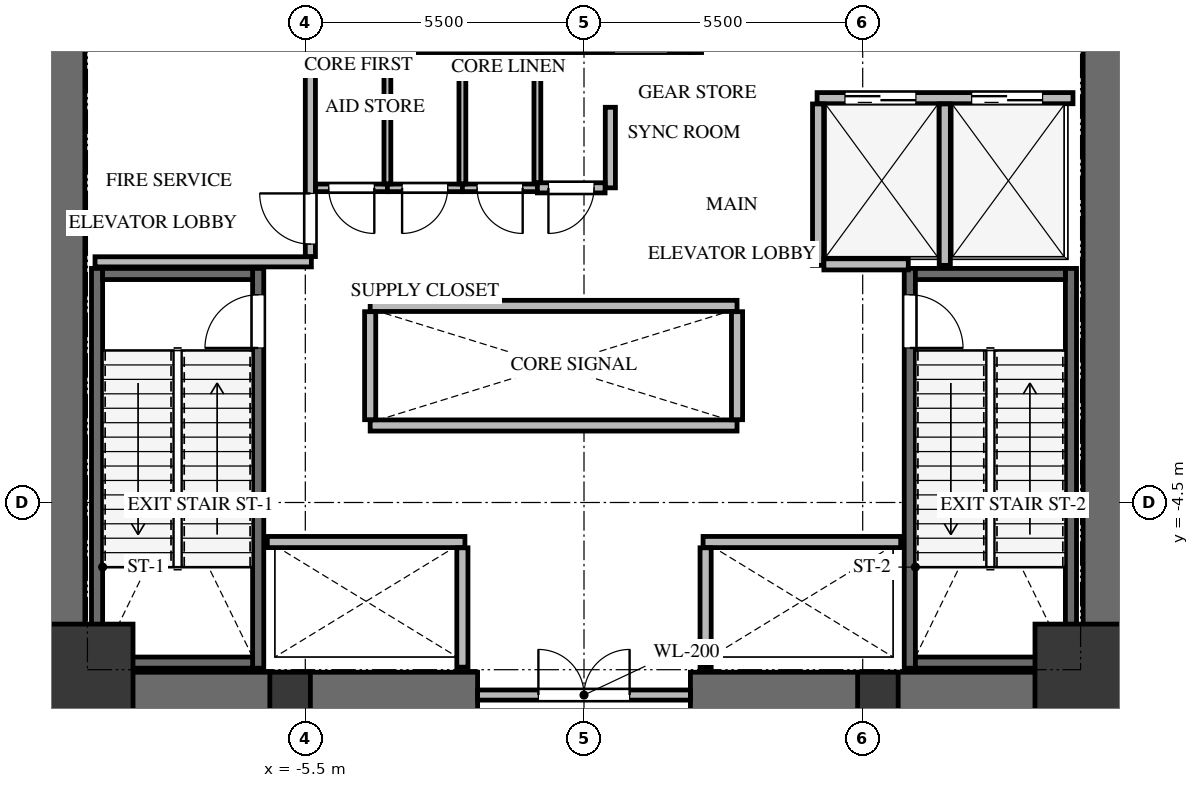
"""IFC4 building model, lengths in metres.
Left out: names, types, materials, properties, quantities, classifications, styles, units other than length and angle.
Written with IfcOpenShell. Run it as: python <this file> out.ifc"""

import sys

from ifc_helpers import new_model, si_unit, direction, frame, frame_2d, origin, origin_2d, place, context, subcontext, project, spatial, rectangle, extrude, source, transform, mapped, element, fill, save


model = new_model("IFC4")
c1 = context("Model", 3, precision=1e-05, world=origin(), true_north=direction((0.0, 1.0)))
c2 = subcontext(c1, "Body", "Model", "MODEL_VIEW")
j1 = project(units=[si_unit("LENGTHUNIT", "METRE"), si_unit("PLANEANGLEUNIT", "RADIAN")], contexts=[c1])
p1 = place(None, origin())
s1 = spatial("IfcSite", under=j1, at=p1, CompositionType="ELEMENT")
p2 = place(p1, origin())
s2 = spatial("IfcBuilding", under=s1, at=p2, CompositionType="ELEMENT")
p3 = place(p2, frame((0.0, 0.0, 26.8)))
s3 = spatial("IfcBuildingStorey", under=s2, at=p3, CompositionType="ELEMENT", Elevation=26.8)
for number, where, z_axis, x_axis in (
    (1, (-10.3, -8.75, 0.0), (0.0, 0.0, 1.0), (0.0, 1.0, 0.0)),
    (2, (10.3, -8.75, 0.0), (0.0, 0.0, 1.0), (0.0, 1.0, 0.0)),
):
    element("IfcWall", number, at=place(p3, frame(where, z_axis=z_axis, x_axis=x_axis)), inside=s3, PredefinedType="SHEAR", context=c2, shape_type="SweptSolid", body=[
        extrude(rectangle(XDim=17.5, YDim=0.9, at=frame_2d((8.75, 0.0))), origin(), (0.0, 0.0, 1.0), 5.6),
    ])
for number, where, z_axis, x_axis in (
    (3, (-9.85, -8.3, 0.0), (0.0, 0.0, 1.0), (1.0, 0.0, 0.0)),
    (4, (2.1, -8.3, 0.0), (0.0, 0.0, 1.0), (1.0, 0.0, 0.0)),
):
    element("IfcWall", number, at=place(p3, frame(where, z_axis=z_axis, x_axis=x_axis)), inside=s3, PredefinedType="SHEAR", context=c2, shape_type="SweptSolid", body=[
        extrude(rectangle(XDim=7.75, YDim=0.9, at=frame_2d((3.875, 0.0))), origin(), (0.0, 0.0, 1.0), 5.6),
    ])
p4 = place(p3, frame((-6.43, -7.77, -0.32), z_axis=(0.0, 0.0, 1.0), x_axis=(0.0, 1.0, 0.0)))
e5 = element("IfcWall", 5, at=p4, inside=s3, PredefinedType="SHEAR", context=c2, shape_type="SweptSolid", body=[
    extrude(rectangle(XDim=7.89, YDim=0.22, at=frame_2d((3.945, 0.0))), origin(), (0.0, 0.0, 1.0), 5.68),
])
p5 = place(p4, frame((6.32, 0.0, 0.0)))
e6 = element("IfcOpeningElement", 6, at=p5, cuts=e5, PredefinedType="OPENING", context=c2, shape_type="SweptSolid", body=[
    extrude(rectangle(XDim=1.05, YDim=2.15, at=frame_2d((0.525, 1.075))), frame((0.0, 0.12, 0.0), z_axis=(0.0, -1.0, 0.0), x_axis=(1.0, 0.0, 0.0)), (0.0, 0.0, 1.0), 0.24),
])
p6 = place(p3, frame((-9.61, 0.12, -0.32), z_axis=(0.0, 0.0, 1.0), x_axis=(0.0, -1.0, 0.0)))
e7 = element("IfcWall", 7, at=p6, inside=s3, PredefinedType="SHEAR", context=c2, shape_type="SweptSolid", body=[
    extrude(rectangle(XDim=7.89, YDim=0.22, at=frame_2d((3.945, 0.0))), origin(), (0.0, 0.0, 1.0), 5.68),
])
for number, where, z_axis, x_axis in (
    (8, (-9.5, -7.66, -0.32), (0.0, 0.0, 1.0), (1.0, 0.0, 0.0)),
    (9, (-6.54, 0.01, -0.32), (0.0, 0.0, 1.0), (-1.0, 0.0, 0.0)),
):
    element("IfcWall", number, at=place(p3, frame(where, z_axis=z_axis, x_axis=x_axis)), inside=s3, PredefinedType="SHEAR", context=c2, shape_type="SweptSolid", body=[
        extrude(rectangle(XDim=2.96, YDim=0.22, at=frame_2d((1.48, 0.0))), origin(), (0.0, 0.0, 1.0), 5.68),
    ])
p7 = place(p3, frame((9.61, -7.77, -0.32), z_axis=(0.0, 0.0, 1.0), x_axis=(0.0, 1.0, 0.0)))
e10 = element("IfcWall", 10, at=p7, inside=s3, PredefinedType="SHEAR", context=c2, shape_type="SweptSolid", body=[
    extrude(rectangle(XDim=7.89, YDim=0.22, at=frame_2d((3.945, 0.0))), origin(), (0.0, 0.0, 1.0), 5.68),
])
p8 = place(p3, frame((6.43, 0.12, -0.32), z_axis=(0.0, 0.0, 1.0), x_axis=(0.0, -1.0, 0.0)))
e11 = element("IfcWall", 11, at=p8, inside=s3, PredefinedType="SHEAR", context=c2, shape_type="SweptSolid", body=[
    extrude(rectangle(XDim=7.89, YDim=0.22, at=frame_2d((3.945, 0.0))), origin(), (0.0, 0.0, 1.0), 5.68),
])
p9 = place(p8, frame((0.52, 0.0, 0.0)))
e12 = element("IfcOpeningElement", 12, at=p9, cuts=e11, PredefinedType="OPENING", context=c2, shape_type="SweptSolid", body=[
    extrude(rectangle(XDim=1.05, YDim=2.15, at=frame_2d((0.525, 1.075))), frame((0.0, 0.12, 0.0), z_axis=(0.0, -1.0, 0.0), x_axis=(1.0, 0.0, 0.0)), (0.0, 0.0, 1.0), 0.24),
])
for number, where, z_axis, x_axis in (
    (13, (6.54, -7.66, -0.32), (0.0, 0.0, 1.0), (1.0, 0.0, 0.0)),
    (14, (9.5, 0.01, -0.32), (0.0, 0.0, 1.0), (-1.0, 0.0, 0.0)),
):
    element("IfcWall", number, at=place(p3, frame(where, z_axis=z_axis, x_axis=x_axis)), inside=s3, PredefinedType="SHEAR", context=c2, shape_type="SweptSolid", body=[
        extrude(rectangle(XDim=2.96, YDim=0.22, at=frame_2d((1.48, 0.0))), origin(), (0.0, 0.0, 1.0), 5.68),
    ])
for number, where, z_axis, x_axis in (
    (15, (2.21, 4.38, -0.32), (0.0, 0.0, 1.0), (0.0, 1.0, 0.0)),
    (16, (-5.36, 7.78, -0.32), (0.0, 0.0, 1.0), (0.0, -1.0, 0.0)),
):
    element("IfcWall", number, at=place(p3, frame(where, z_axis=z_axis, x_axis=x_axis)), inside=s3, PredefinedType="SHEAR", context=c2, shape_type="SweptSolid", body=[
        extrude(rectangle(XDim=3.4, YDim=0.22, at=frame_2d((1.7, 0.0))), origin(), (0.0, 0.0, 1.0), 5.68),
    ])
p10 = place(p3, frame((-5.25, 4.49, -0.32), z_axis=(0.0, 0.0, 1.0), x_axis=(1.0, 0.0, 0.0)))
e17 = element("IfcWall", 17, at=p10, inside=s3, PredefinedType="SHEAR", context=c2, shape_type="SweptSolid", body=[
    extrude(rectangle(XDim=7.35, YDim=0.22, at=frame_2d((3.675, 0.0))), origin(), (0.0, 0.0, 1.0), 5.68),
])
p11 = place(p10, frame((5.85, 0.0, 0.0)))
e18 = element("IfcOpeningElement", 18, at=p11, cuts=e17, PredefinedType="OPENING", context=c2, shape_type="SweptSolid", body=[
    extrude(rectangle(XDim=1.05, YDim=2.15, at=frame_2d((0.525, 1.075))), frame((0.0, 0.12, 0.0), z_axis=(0.0, -1.0, 0.0), x_axis=(1.0, 0.0, 0.0)), (0.0, 0.0, 1.0), 0.24),
])
m1 = source(origin(), c2, "Body", "SweptSolid", [
    extrude(rectangle(XDim=1.8, YDim=1.8, at=origin_2d()), origin(), (0.0, 0.0, 1.0), 5.68),
])
for number, where, z_axis, x_axis in (
    (19, (-9.8, -7.8, -0.32), (0.0, 0.0, 1.0), (1.0, 0.0, 0.0)),
    (20, (9.8, -7.8, -0.32), (0.0, 0.0, 1.0), (1.0, 0.0, 0.0)),
):
    element("IfcColumn", number, at=place(p3, frame(where, z_axis=z_axis, x_axis=x_axis)), inside=s3, PredefinedType="COLUMN", context=c2, shape_type="MappedRepresentation", body=[
        mapped(m1, transform((0.0, 0.0, 0.0), x_axis=(1.0, 0.0, 0.0), y_axis=(0.0, 1.0, 0.0), z_axis=(0.0, 0.0, 1.0), scale=1.0)),
    ])
m2 = source(origin(), c2, "Body", "SweptSolid", [
    extrude(rectangle(XDim=0.8, YDim=0.8, at=origin_2d()), origin(), (0.0, 0.0, 1.0), 5.68),
])
for number, where, z_axis, x_axis in (
    (21, (-5.8, -8.25, -0.32), (0.0, 0.0, 1.0), (1.0, 0.0, 0.0)),
    (22, (5.8, -8.25, -0.32), (0.0, 0.0, 1.0), (1.0, 0.0, 0.0)),
):
    element("IfcColumn", number, at=place(p3, frame(where, z_axis=z_axis, x_axis=x_axis)), inside=s3, PredefinedType="PILASTER", context=c2, shape_type="MappedRepresentation", body=[
        mapped(m2, transform((0.0, 0.0, 0.0), x_axis=(1.0, 0.0, 0.0), y_axis=(0.0, 1.0, 0.0), z_axis=(0.0, 0.0, 1.0), scale=1.0)),
    ])
p12 = place(p3, frame((-2.1, -8.3, 0.0), z_axis=(0.0, 0.0, 1.0), x_axis=(1.0, 0.0, 0.0)))
e23 = element("IfcWall", 23, at=p12, inside=s3, PredefinedType="SOLIDWALL", context=c2, shape_type="SweptSolid", body=[
    extrude(rectangle(XDim=4.2, YDim=0.2, at=frame_2d((2.1, 0.0))), origin(), (0.0, 0.0, 1.0), 5.345),
])
p13 = place(p12, frame((1.2, 0.0, 0.0)))
e24 = element("IfcOpeningElement", 24, at=p13, cuts=e23, PredefinedType="OPENING", context=c2, shape_type="SweptSolid", body=[
    extrude(rectangle(XDim=1.8, YDim=2.15, at=frame_2d((0.9, 1.075))), frame((0.0, 0.11, 0.0), z_axis=(0.0, -1.0, 0.0), x_axis=(1.0, 0.0, 0.0)), (0.0, 0.0, 1.0), 0.22),
])
p14 = place(p3, frame((-9.65, 0.25, 0.0), z_axis=(0.0, 0.0, 1.0), x_axis=(1.0, 0.0, 0.0)))
e25 = element("IfcWall", 25, at=p14, inside=s3, PredefinedType="SOLIDWALL", context=c2, shape_type="SweptSolid", body=[
    extrude(rectangle(XDim=4.27, YDim=0.2, at=frame_2d((2.135, 0.0))), origin(), (0.0, 0.0, 1.0), 5.345),
])
p15 = place(p3, frame((-5.4, 0.354, 0.0), z_axis=(0.0, 0.0, 1.0), x_axis=(0.0, 1.0, 0.0)))
e26 = element("IfcWall", 26, at=p15, inside=s3, PredefinedType="SOLIDWALL", context=c2, shape_type="SweptSolid", body=[
    extrude(rectangle(XDim=4.026, YDim=0.2, at=frame_2d((2.013, 0.0))), origin(), (0.0, 0.0, 1.0), 5.345),
])
p16 = place(p15, frame((0.246, 0.0, 0.0)))
e27 = element("IfcOpeningElement", 27, at=p16, cuts=e26, PredefinedType="OPENING", context=c2, shape_type="SweptSolid", body=[
    extrude(rectangle(XDim=1.0, YDim=2.15, at=frame_2d((0.5, 1.075))), frame((0.0, 0.11, 0.0), z_axis=(0.0, -1.0, 0.0), x_axis=(1.0, 0.0, 0.0)), (0.0, 0.0, 1.0), 0.22),
])
p17 = place(p3, frame((4.6, 3.48, 0.0), z_axis=(0.0, 0.0, 1.0), x_axis=(1.0, 0.0, 0.0)))
e28 = element("IfcWall", 28, at=p17, inside=s3, PredefinedType="SOLIDWALL", context=c2, shape_type="SweptSolid", body=[
    extrude(rectangle(XDim=5.05, YDim=0.22, at=frame_2d((2.525, 0.0))), origin(), (0.0, 0.0, 1.0), 5.345),
])
p18 = place(p17, frame((0.55, 0.0, 0.0)))
e29 = element("IfcOpeningElement", 29, at=p18, cuts=e28, PredefinedType="OPENING", context=c2, shape_type="SweptSolid", body=[
    extrude(rectangle(XDim=1.4, YDim=2.15, at=frame_2d((0.7, 1.075))), frame((0.0, 0.12, 0.0), z_axis=(0.0, -1.0, 0.0), x_axis=(1.0, 0.0, 0.0)), (0.0, 0.0, 1.0), 0.24),
])
p19 = place(p17, frame((3.05, 0.0, 0.0)))
e30 = element("IfcOpeningElement", 30, at=p19, cuts=e28, PredefinedType="OPENING", context=c2, shape_type="SweptSolid", body=[
    extrude(rectangle(XDim=1.4, YDim=2.15, at=frame_2d((0.7, 1.075))), frame((0.0, 0.12, 0.0), z_axis=(0.0, -1.0, 0.0), x_axis=(1.0, 0.0, 0.0)), (0.0, 0.0, 1.0), 0.24),
])
for number, where, z_axis, x_axis in (
    (31, (4.62, 0.18, 0.0), (0.0, 0.0, 1.0), (0.0, 1.0, 0.0)),
    (32, (7.12, 0.18, 0.0), (0.0, 0.0, 1.0), (0.0, 1.0, 0.0)),
):
    element("IfcWall", number, at=place(p3, frame(where, z_axis=z_axis, x_axis=x_axis)), inside=s3, PredefinedType="SOLIDWALL", context=c2, shape_type="SweptSolid", body=[
        extrude(rectangle(XDim=3.186, YDim=0.22, at=frame_2d((1.593, 0.0))), origin(), (0.0, 0.0, 1.0), 5.345),
    ])
p20 = place(p3, frame((4.734, 0.2, 0.0), z_axis=(0.0, 0.0, 1.0), x_axis=(1.0, 0.0, 0.0)))
e33 = element("IfcWall", 33, at=p20, inside=s3, PredefinedType="SOLIDWALL", context=c2, shape_type="SweptSolid", body=[
    extrude(rectangle(XDim=1.666, YDim=0.22, at=frame_2d((0.833, 0.0))), origin(), (0.0, 0.0, 1.0), 5.345),
])
for number, where, z_axis, x_axis in (
    (34, (-6.25, -5.28, 0.0), (0.0, 0.0, 1.0), (1.0, 0.0, 0.0)),
    (35, (2.35, -5.28, 0.0), (0.0, 0.0, 1.0), (1.0, 0.0, 0.0)),
):
    element("IfcWall", number, at=place(p3, frame(where, z_axis=z_axis, x_axis=x_axis)), inside=s3, PredefinedType="SOLIDWALL", context=c2, shape_type="SweptSolid", body=[
        extrude(rectangle(XDim=3.9, YDim=0.22, at=frame_2d((1.95, 0.0))), origin(), (0.0, 0.0, 1.0), 5.345),
    ])
for number, where, z_axis, x_axis in (
    (36, (-2.4, -7.75, 0.0), (0.0, 0.0, 1.0), (0.0, 1.0, 0.0)),
    (37, (2.4, -7.75, 0.0), (0.0, 0.0, 1.0), (0.0, 1.0, 0.0)),
):
    element("IfcWall", number, at=place(p3, frame(where, z_axis=z_axis, x_axis=x_axis)), inside=s3, PredefinedType="SOLIDWALL", context=c2, shape_type="SweptSolid", body=[
        extrude(rectangle(XDim=2.356, YDim=0.22, at=frame_2d((1.178, 0.0))), origin(), (0.0, 0.0, 1.0), 5.345),
    ])
for number, where, z_axis, x_axis in (
    (38, (-4.22, -2.98, 0.0), (0.0, 0.0, 1.0), (1.0, 0.0, 0.0)),
    (39, (-4.22, -0.62, 0.0), (0.0, 0.0, 1.0), (1.0, 0.0, 0.0)),
):
    element("IfcWall", number, at=place(p3, frame(where, z_axis=z_axis, x_axis=x_axis)), inside=s3, PredefinedType="SOLIDWALL", context=c2, shape_type="SweptSolid", body=[
        extrude(rectangle(XDim=7.24, YDim=0.22, at=frame_2d((3.62, 0.0))), origin(), (0.0, 0.0, 1.0), 5.345),
    ])
for number, where, z_axis, x_axis in (
    (40, (-4.22, -2.866, 0.0), (0.0, 0.0, 1.0), (0.0, 1.0, 0.0)),
    (41, (3.02, -2.866, 0.0), (0.0, 0.0, 1.0), (0.0, 1.0, 0.0)),
):
    element("IfcWall", number, at=place(p3, frame(where, z_axis=z_axis, x_axis=x_axis)), inside=s3, PredefinedType="SOLIDWALL", context=c2, shape_type="SweptSolid", body=[
        extrude(rectangle(XDim=2.132, YDim=0.22, at=frame_2d((1.066, 0.0))), origin(), (0.0, 0.0, 1.0), 5.345),
    ])
p21 = place(p3, frame((-3.88, 1.71, 0.0), z_axis=(0.0, 0.0, 1.0), x_axis=(-1.0, 0.0, 0.0)))
e42 = element("IfcWall", 42, at=p21, inside=s3, PredefinedType="PARTITIONING", context=c2, shape_type="SweptSolid", body=[
    extrude(rectangle(XDim=1.416, YDim=0.15, at=frame_2d((0.708, 0.0))), origin(), (0.0, 0.0, 1.0), 5.345),
])
p22 = place(p21, frame((0.258, 0.0, 0.0)))
e43 = element("IfcOpeningElement", 43, at=p22, cuts=e42, PredefinedType="OPENING", context=c2, shape_type="SweptSolid", body=[
    extrude(rectangle(XDim=0.9, YDim=2.05, at=frame_2d((0.45, 1.025))), frame((0.0, 0.085, 0.0), z_axis=(0.0, -1.0, 0.0), x_axis=(1.0, 0.0, 0.0)), (0.0, 0.0, 1.0), 0.17),
])
p23 = place(p3, frame((-2.4, 1.71, 0.0), z_axis=(0.0, 0.0, 1.0), x_axis=(-1.0, 0.0, 0.0)))
e44 = element("IfcWall", 44, at=p23, inside=s3, PredefinedType="PARTITIONING", context=c2, shape_type="SweptSolid", body=[
    extrude(rectangle(XDim=1.48, YDim=0.15, at=frame_2d((0.74, 0.0))), origin(), (0.0, 0.0, 1.0), 5.345),
])
p24 = place(p23, frame((0.29, 0.0, 0.0)))
e45 = element("IfcOpeningElement", 45, at=p24, cuts=e44, PredefinedType="OPENING", context=c2, shape_type="SweptSolid", body=[
    extrude(rectangle(XDim=0.9, YDim=2.05, at=frame_2d((0.45, 1.025))), frame((0.0, 0.085, 0.0), z_axis=(0.0, -1.0, 0.0), x_axis=(1.0, 0.0, 0.0)), (0.0, 0.0, 1.0), 0.17),
])
p25 = place(p3, frame((-0.92, 1.71, 0.0), z_axis=(0.0, 0.0, 1.0), x_axis=(-1.0, 0.0, 0.0)))
e46 = element("IfcWall", 46, at=p25, inside=s3, PredefinedType="PARTITIONING", context=c2, shape_type="SweptSolid", body=[
    extrude(rectangle(XDim=1.48, YDim=0.15, at=frame_2d((0.74, 0.0))), origin(), (0.0, 0.0, 1.0), 5.345),
])
p26 = place(p25, frame((0.29, 0.0, 0.0)))
e47 = element("IfcOpeningElement", 47, at=p26, cuts=e46, PredefinedType="OPENING", context=c2, shape_type="SweptSolid", body=[
    extrude(rectangle(XDim=0.9, YDim=2.05, at=frame_2d((0.45, 1.025))), frame((0.0, 0.085, 0.0), z_axis=(0.0, -1.0, 0.0), x_axis=(1.0, 0.0, 0.0)), (0.0, 0.0, 1.0), 0.17),
])
p27 = place(p3, frame((0.52, 3.3, 0.0), z_axis=(0.0, 0.0, 1.0), x_axis=(0.0, -1.0, 0.0)))
e48 = element("IfcWall", 48, at=p27, inside=s3, PredefinedType="SOLIDWALL", context=c2, shape_type="SweptSolid", body=[
    extrude(rectangle(XDim=1.59, YDim=0.2, at=frame_2d((0.795, 0.0))), origin(), (0.0, 0.0, 1.0), 5.345),
])
p28 = place(p3, frame((0.416, 1.71, 0.0), z_axis=(0.0, 0.0, 1.0), x_axis=(-1.0, 0.0, 0.0)))
e49 = element("IfcWall", 49, at=p28, inside=s3, PredefinedType="SOLIDWALL", context=c2, shape_type="SweptSolid", body=[
    extrude(rectangle(XDim=1.336, YDim=0.2, at=frame_2d((0.668, 0.0))), origin(), (0.0, 0.0, 1.0), 5.345),
])
p29 = place(p28, frame((0.218, 0.0, 0.0)))
e50 = element("IfcOpeningElement", 50, at=p29, cuts=e49, PredefinedType="OPENING", context=c2, shape_type="SweptSolid", body=[
    extrude(rectangle(XDim=0.9, YDim=2.05, at=frame_2d((0.45, 1.025))), frame((0.0, 0.11, 0.0), z_axis=(0.0, -1.0, 0.0), x_axis=(1.0, 0.0, 0.0)), (0.0, 0.0, 1.0), 0.22),
])
for number, where, z_axis, x_axis in (
    (51, (-3.88, 4.375, 0.0), (0.0, 0.0, 1.0), (0.0, -1.0, 0.0)),
    (52, (-2.4, 4.375, 0.0), (0.0, 0.0, 1.0), (0.0, -1.0, 0.0)),
):
    element("IfcWall", number, at=place(p3, frame(where, z_axis=z_axis, x_axis=x_axis)), inside=s3, PredefinedType="PARTITIONING", context=c2, shape_type="SweptSolid", body=[
        extrude(rectangle(XDim=2.586, YDim=0.135, at=frame_2d((1.293, 0.0))), origin(), (0.0, 0.0, 1.0), 5.345),
    ])
p30 = place(p3, frame((-0.92, 4.375, 0.0), z_axis=(0.0, 0.0, 1.0), x_axis=(0.0, -1.0, 0.0)))
e53 = element("IfcWall", 53, at=p30, inside=s3, PredefinedType="PARTITIONING", context=c2, shape_type="SweptSolid", body=[
    extrude(rectangle(XDim=2.561, YDim=0.135, at=frame_2d((1.281, 0.0))), origin(), (0.0, 0.0, 1.0), 5.345),
])
m3 = source(origin(), c2, "Body", "SweptSolid", [
    extrude(rectangle(XDim=1.05, YDim=2.15, at=frame_2d((0.525, 1.075))), frame((0.0, 0.025, 0.0), z_axis=(0.0, -1.0, 0.0), x_axis=(1.0, 0.0, 0.0)), (0.0, 0.0, 1.0), 0.05),
])
p31 = place(p5, origin())
e54 = element("IfcDoor", 54, at=p31, inside=s3, OperationType="SINGLE_SWING_LEFT", PredefinedType="DOOR", context=c2, shape_type="MappedRepresentation", body=[
    mapped(m3, transform((0.0, 0.0, 0.0), x_axis=(1.0, 0.0, 0.0), y_axis=(0.0, 1.0, 0.0), z_axis=(0.0, 0.0, 1.0), scale=1.0)),
])
fill(e6, e54)
m4 = source(origin(), c2, "Body", "SweptSolid", [
    extrude(rectangle(XDim=1.05, YDim=2.15, at=frame_2d((0.525, 1.075))), frame((0.0, 0.025, 0.0), z_axis=(0.0, -1.0, 0.0), x_axis=(1.0, 0.0, 0.0)), (0.0, 0.0, 1.0), 0.05),
])
p32 = place(p9, origin())
e55 = element("IfcDoor", 55, at=p32, inside=s3, OperationType="SINGLE_SWING_RIGHT", PredefinedType="DOOR", context=c2, shape_type="MappedRepresentation", body=[
    mapped(m4, transform((0.0, 0.0, 0.0), x_axis=(1.0, 0.0, 0.0), y_axis=(0.0, 1.0, 0.0), z_axis=(0.0, 0.0, 1.0), scale=1.0)),
])
fill(e12, e55)
m5 = source(origin(), c2, "Body", "SweptSolid", [
    extrude(rectangle(XDim=1.8, YDim=2.15, at=frame_2d((0.9, 1.075))), frame((0.0, 0.025, 0.0), z_axis=(0.0, -1.0, 0.0), x_axis=(1.0, 0.0, 0.0)), (0.0, 0.0, 1.0), 0.05),
])
p33 = place(p13, origin())
e56 = element("IfcDoor", 56, at=p33, inside=s3, OperationType="DOUBLE_DOOR_SINGLE_SWING", PredefinedType="DOOR", context=c2, shape_type="MappedRepresentation", body=[
    mapped(m5, transform((0.0, 0.0, 0.0), x_axis=(1.0, 0.0, 0.0), y_axis=(0.0, 1.0, 0.0), z_axis=(0.0, 0.0, 1.0), scale=1.0)),
])
fill(e24, e56)
m6 = source(origin(), c2, "Body", "SweptSolid", [
    extrude(rectangle(XDim=1.0, YDim=2.15, at=frame_2d((0.5, 1.075))), frame((0.0, 0.025, 0.0), z_axis=(0.0, -1.0, 0.0), x_axis=(1.0, 0.0, 0.0)), (0.0, 0.0, 1.0), 0.05),
])
p34 = place(p16, origin())
e57 = element("IfcDoor", 57, at=p34, inside=s3, OperationType="SINGLE_SWING_RIGHT", PredefinedType="DOOR", context=c2, shape_type="MappedRepresentation", body=[
    mapped(m6, transform((0.0, 0.0, 0.0), x_axis=(1.0, 0.0, 0.0), y_axis=(0.0, 1.0, 0.0), z_axis=(0.0, 0.0, 1.0), scale=1.0)),
])
fill(e27, e57)
m7 = source(origin(), c2, "Body", "SweptSolid", [
    extrude(rectangle(XDim=1.4, YDim=2.15, at=frame_2d((0.7, 1.075))), frame((0.0, 0.025, 0.0), z_axis=(0.0, -1.0, 0.0), x_axis=(1.0, 0.0, 0.0)), (0.0, 0.0, 1.0), 0.05),
])
p35 = place(p18, origin())
e58 = element("IfcDoor", 58, at=p35, inside=s3, OperationType="DOUBLE_DOOR_SLIDING", PredefinedType="DOOR", context=c2, shape_type="MappedRepresentation", body=[
    mapped(m7, transform((0.0, 0.0, 0.0), x_axis=(1.0, 0.0, 0.0), y_axis=(0.0, 1.0, 0.0), z_axis=(0.0, 0.0, 1.0), scale=1.0)),
])
fill(e29, e58)
p36 = place(p19, origin())
e59 = element("IfcDoor", 59, at=p36, inside=s3, OperationType="DOUBLE_DOOR_SLIDING", PredefinedType="DOOR", context=c2, shape_type="MappedRepresentation", body=[
    mapped(m7, transform((0.0, 0.0, 0.0), x_axis=(1.0, 0.0, 0.0), y_axis=(0.0, 1.0, 0.0), z_axis=(0.0, 0.0, 1.0), scale=1.0)),
])
fill(e30, e59)
m8 = source(origin(), c2, "Body", "SweptSolid", [
    extrude(rectangle(XDim=0.9, YDim=2.05, at=frame_2d((0.45, 1.025))), frame((0.0, 0.025, 0.0), z_axis=(0.0, -1.0, 0.0), x_axis=(1.0, 0.0, 0.0)), (0.0, 0.0, 1.0), 0.05),
])
p37 = place(p22, origin())
e60 = element("IfcDoor", 60, at=p37, inside=s3, OperationType="SINGLE_SWING_LEFT", PredefinedType="DOOR", context=c2, shape_type="MappedRepresentation", body=[
    mapped(m8, transform((0.0, 0.0, 0.0), x_axis=(1.0, 0.0, 0.0), y_axis=(0.0, 1.0, 0.0), z_axis=(0.0, 0.0, 1.0), scale=1.0)),
])
fill(e43, e60)
m9 = source(origin(), c2, "Body", "SweptSolid", [
    extrude(rectangle(XDim=0.9, YDim=2.05, at=frame_2d((0.45, 1.025))), frame((0.0, 0.025, 0.0), z_axis=(0.0, -1.0, 0.0), x_axis=(1.0, 0.0, 0.0)), (0.0, 0.0, 1.0), 0.05),
])
p38 = place(p24, origin())
e61 = element("IfcDoor", 61, at=p38, inside=s3, OperationType="SINGLE_SWING_RIGHT", PredefinedType="DOOR", context=c2, shape_type="MappedRepresentation", body=[
    mapped(m9, transform((0.0, 0.0, 0.0), x_axis=(1.0, 0.0, 0.0), y_axis=(0.0, 1.0, 0.0), z_axis=(0.0, 0.0, 1.0), scale=1.0)),
])
fill(e45, e61)
p39 = place(p26, origin())
e62 = element("IfcDoor", 62, at=p39, inside=s3, OperationType="SINGLE_SWING_LEFT", PredefinedType="DOOR", context=c2, shape_type="MappedRepresentation", body=[
    mapped(m8, transform((0.0, 0.0, 0.0), x_axis=(1.0, 0.0, 0.0), y_axis=(0.0, 1.0, 0.0), z_axis=(0.0, 0.0, 1.0), scale=1.0)),
])
fill(e47, e62)
p40 = place(p29, origin())
e63 = element("IfcDoor", 63, at=p40, inside=s3, OperationType="SINGLE_SWING_RIGHT", PredefinedType="DOOR", context=c2, shape_type="MappedRepresentation", body=[
    mapped(m9, transform((0.0, 0.0, 0.0), x_axis=(1.0, 0.0, 0.0), y_axis=(0.0, 1.0, 0.0), z_axis=(0.0, 0.0, 1.0), scale=1.0)),
])
fill(e50, e63)
save(model, sys.argv[1])
